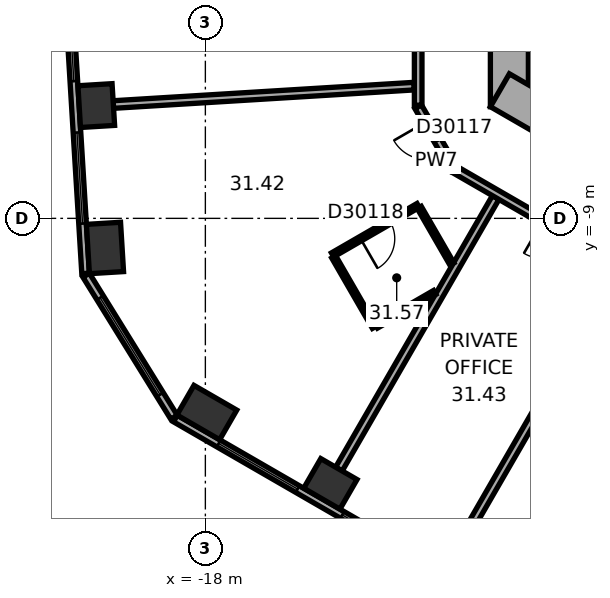
"""IFC4 building model, lengths in metres.
Left out: names, types, materials, properties, quantities, classifications, styles, units other than length and angle.
Written with IfcOpenShell. Run it as: python <this file> out.ifc"""

import sys

from ifc_helpers import new_model, si_unit, direction, frame, frame_2d, origin, origin_2d, place, context, subcontext, project, spatial, rectangle, extrude, element, fill, save


model = new_model("IFC4")
c1 = context("Model", 3, precision=1e-05, world=origin(), true_north=direction((0.0, 1.0)))
c2 = subcontext(c1, "Body", "Model", "MODEL_VIEW")
j1 = project(units=[si_unit("LENGTHUNIT", "METRE"), si_unit("PLANEANGLEUNIT", "RADIAN")], contexts=[c1])
p1 = place(None, origin())
s1 = spatial("IfcSite", under=j1, at=p1, CompositionType="ELEMENT")
p2 = place(p1, origin())
s2 = spatial("IfcBuilding", under=s1, at=p2, CompositionType="ELEMENT")
p3 = place(p2, frame((0.0, 0.0, 128.1)))
s3 = spatial("IfcBuildingStorey", under=s2, at=p3, CompositionType="ELEMENT", Elevation=128.1)
p4 = place(p3, frame((-20.871, -6.032, 0.0), z_axis=(0.0, 0.0, 1.0), x_axis=(0.061048539535, -0.998134798422, 0.0)))
e1 = element("IfcColumn", 1, at=p4, inside=s3, PredefinedType="COLUMN", context=c2, shape_type="SweptSolid", body=[
    extrude(rectangle(XDim=1.1, YDim=0.9, at=origin_2d()), origin(), (0.0, 0.0, 1.0), 3.7),
])
for number, where, z_axis, x_axis in (
    (2, (-20.642, -9.779, 0.0), (0.0, 0.0, 1.0), (0.061, -0.998, 0.0)),
    (3, (-17.962, -14.109, 0.0), (0.0, 0.0, 1.0), (0.866, -0.5, 0.0)),
):
    element("IfcColumn", number, at=place(p3, frame(where, z_axis=z_axis, x_axis=x_axis)), inside=s3, PredefinedType="COLUMN", context=c2, shape_type="SweptSolid", body=[
        extrude(rectangle(XDim=1.3, YDim=0.9, at=origin_2d()), origin(), (0.0, 0.0, 1.0), 3.7),
    ])
p5 = place(p3, frame((-14.711, -15.986, 0.0), z_axis=(0.0, 0.0, 1.0), x_axis=(0.866025403784, -0.5, 0.0)))
e4 = element("IfcColumn", 4, at=p5, inside=s3, PredefinedType="COLUMN", context=c2, shape_type="SweptSolid", body=[
    extrude(rectangle(XDim=1.1, YDim=0.9, at=origin_2d()), origin(), (0.0, 0.0, 1.0), 3.7),
])
p6 = place(p3, frame((-10.0, 6.062, 0.0), z_axis=(0.0, 0.0, 1.0), x_axis=(0.0, -1.0, 0.0)))
e5 = element("IfcWall", 5, at=p6, inside=s3, PredefinedType="SHEAR", context=c2, shape_type="SweptSolid", body=[
    extrude(rectangle(XDim=12.125, YDim=1.0, at=frame_2d((6.062, 0.0))), origin(), (0.0, 0.0, 1.0), 3.7),
])
p7 = place(p6, frame((6.612, 0.0, 0.0)))
e6 = element("IfcOpeningElement", 6, at=p7, cuts=e5, PredefinedType="OPENING", context=c2, shape_type="SweptSolid", body=[
    extrude(rectangle(XDim=0.9, YDim=2.1, at=frame_2d((0.45, 1.05))), frame((0.0, 0.51, 0.0), z_axis=(0.0, -1.0, 0.0), x_axis=(1.0, 0.0, 0.0)), (0.0, 0.0, 1.0), 1.02),
])
p8 = place(p3, frame((-10.25, -5.629, 0.0), z_axis=(0.0, 0.0, 1.0), x_axis=(0.866022616891, -0.50000482701, 0.0)))
e7 = element("IfcWall", 7, at=p8, inside=s3, PredefinedType="SHEAR", context=c2, shape_type="SweptSolid", body=[
    extrude(rectangle(XDim=12.125, YDim=1.0, at=frame_2d((6.062, 0.0))), origin(), (0.0, 0.0, 1.0), 3.7),
])
p9 = place(p8, frame((6.262, 0.0, 0.0)))
e8 = element("IfcOpeningElement", 8, at=p9, cuts=e7, PredefinedType="OPENING", context=c2, shape_type="SweptSolid", body=[
    extrude(rectangle(XDim=1.5, YDim=2.1, at=frame_2d((0.75, 1.05))), frame((0.0, 0.51, 0.0), z_axis=(0.0, -1.0, 0.0), x_axis=(1.0, 0.0, 0.0)), (0.0, 0.0, 1.0), 1.02),
])
p10 = place(p8, frame((1.812, 0.0, 0.0)))
e9 = element("IfcOpeningElement", 9, at=p10, cuts=e7, PredefinedType="OPENING", context=c2, shape_type="SweptSolid", body=[
    extrude(rectangle(XDim=0.9, YDim=2.1, at=frame_2d((0.45, 1.05))), frame((0.0, 0.51, 0.0), z_axis=(0.0, -1.0, 0.0), x_axis=(1.0, 0.0, 0.0)), (0.0, 0.0, 1.0), 1.02),
])
p11 = place(p8, frame((4.412, 0.0, 0.0)))
e10 = element("IfcOpeningElement", 10, at=p11, cuts=e7, PredefinedType="OPENING", context=c2, shape_type="SweptSolid", body=[
    extrude(rectangle(XDim=0.9, YDim=2.1, at=frame_2d((0.45, 1.05))), frame((0.0, 0.51, 0.0), z_axis=(0.0, -1.0, 0.0), x_axis=(1.0, 0.0, 0.0)), (0.0, 0.0, 1.0), 1.02),
])
p12 = place(p3, frame((-22.375, 9.557, 0.0), z_axis=(0.0, 0.0, 1.0), x_axis=(0.061036015339, -0.998135564356, 0.0)))
e11 = element("IfcWall", 11, at=p12, inside=s3, PredefinedType="STANDARD", context=c2, shape_type="SweptSolid", body=[
    extrude(rectangle(XDim=20.044, YDim=0.2, at=frame_2d((10.022, 0.0))), origin(), (0.0, 0.0, 1.0), 3.7),
])
p13 = place(p12, frame((1.313, 0.0, 0.9)))
e12 = element("IfcOpeningElement", 12, at=p13, cuts=e11, PredefinedType="OPENING", context=c2, shape_type="SweptSolid", body=[
    extrude(rectangle(XDim=2.4, YDim=2.0, at=frame_2d((1.2, 1.0))), frame((0.0, 0.11, 0.0), z_axis=(0.0, -1.0, 0.0), x_axis=(1.0, 0.0, 0.0)), (0.0, 0.0, 1.0), 0.22),
])
p14 = place(p12, frame((5.067, 0.0, 0.9)))
e13 = element("IfcOpeningElement", 13, at=p14, cuts=e11, PredefinedType="OPENING", context=c2, shape_type="SweptSolid", body=[
    extrude(rectangle(XDim=2.4, YDim=2.0, at=frame_2d((1.2, 1.0))), frame((0.0, 0.11, 0.0), z_axis=(0.0, -1.0, 0.0), x_axis=(1.0, 0.0, 0.0)), (0.0, 0.0, 1.0), 0.22),
])
p15 = place(p12, frame((8.821, 0.0, 0.9)))
e14 = element("IfcOpeningElement", 14, at=p15, cuts=e11, PredefinedType="OPENING", context=c2, shape_type="SweptSolid", body=[
    extrude(rectangle(XDim=2.4, YDim=2.0, at=frame_2d((1.2, 1.0))), frame((0.0, 0.11, 0.0), z_axis=(0.0, -1.0, 0.0), x_axis=(1.0, 0.0, 0.0)), (0.0, 0.0, 1.0), 0.22),
])
p16 = place(p12, frame((12.575, 0.0, 0.9)))
e15 = element("IfcOpeningElement", 15, at=p16, cuts=e11, PredefinedType="OPENING", context=c2, shape_type="SweptSolid", body=[
    extrude(rectangle(XDim=2.4, YDim=2.0, at=frame_2d((1.2, 1.0))), frame((0.0, 0.11, 0.0), z_axis=(0.0, -1.0, 0.0), x_axis=(1.0, 0.0, 0.0)), (0.0, 0.0, 1.0), 0.22),
])
p17 = place(p12, frame((16.329, 0.0, 0.9)))
e16 = element("IfcOpeningElement", 16, at=p17, cuts=e11, PredefinedType="OPENING", context=c2, shape_type="SweptSolid", body=[
    extrude(rectangle(XDim=2.4, YDim=2.0, at=frame_2d((1.2, 1.0))), frame((0.0, 0.11, 0.0), z_axis=(0.0, -1.0, 0.0), x_axis=(1.0, 0.0, 0.0)), (0.0, 0.0, 1.0), 0.22),
])
p18 = place(p3, frame((-21.137, -10.496, 0.0), z_axis=(0.0, 0.0, 1.0), x_axis=(0.526178661629, -0.850374044786, 0.0)))
e17 = element("IfcWall", 17, at=p18, inside=s3, PredefinedType="STANDARD", context=c2, shape_type="SweptSolid", body=[
    extrude(rectangle(XDim=4.395, YDim=0.2, at=frame_2d((2.197, 0.0))), origin(), (0.0, 0.0, 1.0), 3.7),
])
p19 = place(p18, frame((0.698, 0.0, 0.9)))
e18 = element("IfcOpeningElement", 18, at=p19, cuts=e17, PredefinedType="OPENING", context=c2, shape_type="SweptSolid", body=[
    extrude(rectangle(XDim=3.0, YDim=2.0, at=frame_2d((1.5, 1.0))), frame((0.0, 0.11, 0.0), z_axis=(0.0, -1.0, 0.0), x_axis=(1.0, 0.0, 0.0)), (0.0, 0.0, 1.0), 0.22),
])
p20 = place(p3, frame((-18.789, -14.267, 0.0), z_axis=(0.0, 0.0, 1.0), x_axis=(0.866023315909, -0.500003616288, 0.0)))
e19 = element("IfcWall", 19, at=p20, inside=s3, PredefinedType="STANDARD", context=c2, shape_type="SweptSolid", body=[
    extrude(rectangle(XDim=20.044, YDim=0.2, at=frame_2d((10.022, 0.0))), origin(), (0.0, 0.0, 1.0), 3.7),
])
p21 = place(p20, frame((1.314, 0.0, 0.9)))
e20 = element("IfcOpeningElement", 20, at=p21, cuts=e19, PredefinedType="OPENING", context=c2, shape_type="SweptSolid", body=[
    extrude(rectangle(XDim=2.4, YDim=2.0, at=frame_2d((1.2, 1.0))), frame((0.0, 0.11, 0.0), z_axis=(0.0, -1.0, 0.0), x_axis=(1.0, 0.0, 0.0)), (0.0, 0.0, 1.0), 0.22),
])
p22 = place(p20, frame((5.069, 0.0, 0.9)))
e21 = element("IfcOpeningElement", 21, at=p22, cuts=e19, PredefinedType="OPENING", context=c2, shape_type="SweptSolid", body=[
    extrude(rectangle(XDim=2.4, YDim=2.0, at=frame_2d((1.2, 1.0))), frame((0.0, 0.11, 0.0), z_axis=(0.0, -1.0, 0.0), x_axis=(1.0, 0.0, 0.0)), (0.0, 0.0, 1.0), 0.22),
])
p23 = place(p20, frame((8.823, 0.0, 0.9)))
e22 = element("IfcOpeningElement", 22, at=p23, cuts=e19, PredefinedType="OPENING", context=c2, shape_type="SweptSolid", body=[
    extrude(rectangle(XDim=2.4, YDim=2.0, at=frame_2d((1.2, 1.0))), frame((0.0, 0.11, 0.0), z_axis=(0.0, -1.0, 0.0), x_axis=(1.0, 0.0, 0.0)), (0.0, 0.0, 1.0), 0.22),
])
p24 = place(p20, frame((12.577, 0.0, 0.9)))
e23 = element("IfcOpeningElement", 23, at=p24, cuts=e19, PredefinedType="OPENING", context=c2, shape_type="SweptSolid", body=[
    extrude(rectangle(XDim=2.4, YDim=2.0, at=frame_2d((1.2, 1.0))), frame((0.0, 0.11, 0.0), z_axis=(0.0, -1.0, 0.0), x_axis=(1.0, 0.0, 0.0)), (0.0, 0.0, 1.0), 0.22),
])
p25 = place(p20, frame((16.331, 0.0, 0.9)))
e24 = element("IfcOpeningElement", 24, at=p25, cuts=e19, PredefinedType="OPENING", context=c2, shape_type="SweptSolid", body=[
    extrude(rectangle(XDim=2.4, YDim=2.0, at=frame_2d((1.2, 1.0))), frame((0.0, 0.11, 0.0), z_axis=(0.0, -1.0, 0.0), x_axis=(1.0, 0.0, 0.0)), (0.0, 0.0, 1.0), 0.22),
])
p26 = place(p3, frame((-20.421, -6.005, 0.0), z_axis=(0.0, 0.0, 1.0), x_axis=(0.998134865741, 0.061047438866, 0.0)))
e25 = element("IfcWall", 25, at=p26, inside=s3, PredefinedType="PARTITIONING", context=c2, shape_type="SweptSolid", body=[
    extrude(rectangle(XDim=7.927, YDim=0.2, at=frame_2d((3.963, 0.0))), origin(), (0.0, 0.0, 1.0), 2.87),
])
p27 = place(p3, frame((-14.653, -9.961, 0.0), z_axis=(0.0, 0.0, 1.0), x_axis=(0.866021400173, 0.500006934395, 0.0)))
e26 = element("IfcWall", 26, at=p27, inside=s3, PredefinedType="PARTITIONING", context=c2, shape_type="SweptSolid", body=[
    extrude(rectangle(XDim=2.6, YDim=0.12, at=frame_2d((1.3, 0.0))), origin(), (0.0, 0.0, 1.0), 3.42),
])
p28 = place(p27, frame((0.85, 0.0, 0.0)))
e27 = element("IfcOpeningElement", 27, at=p28, cuts=e26, PredefinedType="OPENING", context=c2, shape_type="SweptSolid", body=[
    extrude(rectangle(XDim=0.9, YDim=2.1, at=frame_2d((0.45, 1.05))), frame((0.0, 0.07, 0.0), z_axis=(0.0, -1.0, 0.0), x_axis=(1.0, 0.0, 0.0)), (0.0, 0.0, 1.0), 0.14),
])
p29 = place(p3, frame((-14.486, -15.597, 0.0), z_axis=(0.0, 0.0, 1.0), x_axis=(0.499996545922, 0.866027397988, 0.0)))
e28 = element("IfcWall", 28, at=p29, inside=s3, PredefinedType="PARTITIONING", context=c2, shape_type="SweptSolid", body=[
    extrude(rectangle(XDim=8.25, YDim=0.2, at=frame_2d((4.125, 0.0))), origin(), (0.0, 0.0, 1.0), 3.42),
])
p30 = place(p3, frame((-13.552, -11.866, 0.0), z_axis=(0.0, 0.0, 1.0), x_axis=(-0.500028586798, 0.86600889856, 0.0)))
e29 = element("IfcWall", 29, at=p30, inside=s3, PredefinedType="PARTITIONING", context=c2, shape_type="SweptSolid", body=[
    extrude(rectangle(XDim=2.14, YDim=0.12, at=frame_2d((1.07, 0.0))), origin(), (0.0, 0.0, 1.0), 3.42),
])
p31 = place(p3, frame((-12.4, -6.062, 0.0), z_axis=(0.0, 0.0, 1.0), x_axis=(0.500022797313, -0.86601224135, 0.0)))
e30 = element("IfcWall", 30, at=p31, inside=s3, PredefinedType="PARTITIONING", context=c2, shape_type="SweptSolid", body=[
    extrude(rectangle(XDim=1.9, YDim=0.2, at=frame_2d((0.95, 0.0))), origin(), (0.0, 0.0, 1.0), 3.42),
])
p32 = place(p31, frame((0.45, 0.0, 0.0)))
e31 = element("IfcOpeningElement", 31, at=p32, cuts=e30, PredefinedType="OPENING", context=c2, shape_type="SweptSolid", body=[
    extrude(rectangle(XDim=1.0, YDim=2.1, at=frame_2d((0.5, 1.05))), frame((0.0, 0.11, 0.0), z_axis=(0.0, -1.0, 0.0), x_axis=(1.0, 0.0, 0.0)), (0.0, 0.0, 1.0), 0.22),
])
p33 = place(p3, frame((-12.4, 5.769, 0.0), z_axis=(0.0, 0.0, 1.0), x_axis=(0.0, -1.0, 0.0)))
e32 = element("IfcWall", 32, at=p33, inside=s3, PredefinedType="PARTITIONING", context=c2, shape_type="SweptSolid", body=[
    extrude(rectangle(XDim=11.792, YDim=0.2, at=frame_2d((5.896, 0.0))), origin(), (0.0, 0.0, 1.0), 3.42),
])
p34 = place(p33, frame((6.267, 0.0, 0.0)))
e33 = element("IfcOpeningElement", 33, at=p34, cuts=e32, PredefinedType="OPENING", context=c2, shape_type="SweptSolid", body=[
    extrude(rectangle(XDim=1.0, YDim=2.1, at=frame_2d((0.5, 1.05))), frame((0.0, 0.11, 0.0), z_axis=(0.0, -1.0, 0.0), x_axis=(1.0, 0.0, 0.0)), (0.0, 0.0, 1.0), 0.22),
])
p35 = place(p3, frame((-12.371, -8.713, 0.0), z_axis=(0.0, 0.0, 1.0), x_axis=(0.499910907645, -0.86607683517, 0.0)))
e34 = element("IfcWall", 34, at=p35, inside=s3, PredefinedType="PARTITIONING", context=c2, shape_type="SweptSolid", body=[
    extrude(rectangle(XDim=1.719, YDim=0.12, at=frame_2d((0.86, 0.0))), origin(), (0.0, 0.0, 1.0), 3.42),
])
p36 = place(p3, frame((-11.964, -10.949, 0.0), z_axis=(0.0, 0.0, 1.0), x_axis=(-0.86600680221, -0.500032217487, 0.0)))
e35 = element("IfcWall", 35, at=p36, inside=s3, PredefinedType="PARTITIONING", context=c2, shape_type="SweptSolid", body=[
    extrude(rectangle(XDim=1.774, YDim=0.12, at=frame_2d((0.887, 0.0))), origin(), (0.0, 0.0, 1.0), 3.42),
])
p37 = place(p3, frame((-11.415, -7.728, 0.0), z_axis=(0.0, 0.0, 1.0), x_axis=(0.866022749921, -0.500004596598, 0.0)))
e36 = element("IfcWall", 36, at=p37, inside=s3, PredefinedType="PARTITIONING", context=c2, shape_type="SweptSolid", body=[
    extrude(rectangle(XDim=12.084, YDim=0.2, at=frame_2d((6.042, 0.0))), origin(), (0.0, 0.0, 1.0), 3.42),
])
p38 = place(p37, frame((2.652, 0.0, 0.0)))
e37 = element("IfcOpeningElement", 37, at=p38, cuts=e36, PredefinedType="OPENING", context=c2, shape_type="SweptSolid", body=[
    extrude(rectangle(XDim=1.0, YDim=2.1, at=frame_2d((0.5, 1.05))), frame((0.0, 0.11, 0.0), z_axis=(0.0, -1.0, 0.0), x_axis=(1.0, 0.0, 0.0)), (0.0, 0.0, 1.0), 0.22),
])
p39 = place(p37, frame((6.406, 0.0, 0.0)))
e38 = element("IfcOpeningElement", 38, at=p39, cuts=e36, PredefinedType="OPENING", context=c2, shape_type="SweptSolid", body=[
    extrude(rectangle(XDim=1.0, YDim=2.1, at=frame_2d((0.5, 1.05))), frame((0.0, 0.11, 0.0), z_axis=(0.0, -1.0, 0.0), x_axis=(1.0, 0.0, 0.0)), (0.0, 0.0, 1.0), 0.22),
])
p40 = place(p37, frame((9.934, 0.0, 0.0)))
e39 = element("IfcOpeningElement", 39, at=p40, cuts=e36, PredefinedType="OPENING", context=c2, shape_type="SweptSolid", body=[
    extrude(rectangle(XDim=1.0, YDim=2.1, at=frame_2d((0.5, 1.05))), frame((0.0, 0.11, 0.0), z_axis=(0.0, -1.0, 0.0), x_axis=(1.0, 0.0, 0.0)), (0.0, 0.0, 1.0), 0.22),
])
p41 = place(p3, frame((-11.235, -17.474, 0.0), z_axis=(0.0, 0.0, 1.0), x_axis=(0.499996545922, 0.866027397988, 0.0)))
e40 = element("IfcWall", 40, at=p41, inside=s3, PredefinedType="PARTITIONING", context=c2, shape_type="SweptSolid", body=[
    extrude(rectangle(XDim=8.25, YDim=0.2, at=frame_2d((4.125, 0.0))), origin(), (0.0, 0.0, 1.0), 2.87),
])
p42 = place(p16, origin())
e41 = element("IfcWindow", 41, at=p42, inside=s3, PartitioningType="SINGLE_PANEL", PredefinedType="WINDOW", context=c2, shape_type="SweptSolid", body=[
    extrude(rectangle(XDim=2.4, YDim=2.0, at=frame_2d((1.2, 1.0))), frame((0.0, 0.03, 0.0), z_axis=(0.0, -1.0, 0.0), x_axis=(1.0, 0.0, 0.0)), (0.0, 0.0, 1.0), 0.06),
])
fill(e15, e41)
p43 = place(p17, origin())
e42 = element("IfcWindow", 42, at=p43, inside=s3, PartitioningType="SINGLE_PANEL", PredefinedType="WINDOW", context=c2, shape_type="SweptSolid", body=[
    extrude(rectangle(XDim=2.4, YDim=2.0, at=frame_2d((1.2, 1.0))), frame((0.0, 0.03, 0.0), z_axis=(0.0, -1.0, 0.0), x_axis=(1.0, 0.0, 0.0)), (0.0, 0.0, 1.0), 0.06),
])
fill(e16, e42)
p44 = place(p19, origin())
e43 = element("IfcWindow", 43, at=p44, inside=s3, PartitioningType="SINGLE_PANEL", PredefinedType="WINDOW", context=c2, shape_type="SweptSolid", body=[
    extrude(rectangle(XDim=3.0, YDim=2.0, at=frame_2d((1.5, 1.0))), frame((0.0, 0.03, 0.0), z_axis=(0.0, -1.0, 0.0), x_axis=(1.0, 0.0, 0.0)), (0.0, 0.0, 1.0), 0.06),
])
fill(e18, e43)
p45 = place(p21, origin())
e44 = element("IfcWindow", 44, at=p45, inside=s3, PartitioningType="SINGLE_PANEL", PredefinedType="WINDOW", context=c2, shape_type="SweptSolid", body=[
    extrude(rectangle(XDim=2.4, YDim=2.0, at=frame_2d((1.2, 1.0))), frame((0.0, 0.03, 0.0), z_axis=(0.0, -1.0, 0.0), x_axis=(1.0, 0.0, 0.0)), (0.0, 0.0, 1.0), 0.06),
])
fill(e20, e44)
p46 = place(p22, origin())
e45 = element("IfcWindow", 45, at=p46, inside=s3, PartitioningType="SINGLE_PANEL", PredefinedType="WINDOW", context=c2, shape_type="SweptSolid", body=[
    extrude(rectangle(XDim=2.4, YDim=2.0, at=frame_2d((1.2, 1.0))), frame((0.0, 0.03, 0.0), z_axis=(0.0, -1.0, 0.0), x_axis=(1.0, 0.0, 0.0)), (0.0, 0.0, 1.0), 0.06),
])
fill(e21, e45)
p47 = place(p32, origin())
e46 = element("IfcDoor", 46, at=p47, inside=s3, OperationType="SINGLE_SWING_LEFT", PredefinedType="DOOR", context=c2, shape_type="SweptSolid", body=[
    extrude(rectangle(XDim=1.0, YDim=2.1, at=frame_2d((0.5, 1.05))), frame((0.0, 0.025, 0.0), z_axis=(0.0, -1.0, 0.0), x_axis=(1.0, 0.0, 0.0)), (0.0, 0.0, 1.0), 0.05),
])
fill(e31, e46)
p48 = place(p28, origin())
e47 = element("IfcDoor", 47, at=p48, inside=s3, OperationType="SINGLE_SWING_LEFT", PredefinedType="DOOR", context=c2, shape_type="SweptSolid", body=[
    extrude(rectangle(XDim=0.9, YDim=2.1, at=frame_2d((0.45, 1.05))), frame((0.0, 0.025, 0.0), z_axis=(0.0, -1.0, 0.0), x_axis=(1.0, 0.0, 0.0)), (0.0, 0.0, 1.0), 0.05),
])
fill(e27, e47)
save(model, sys.argv[1])
